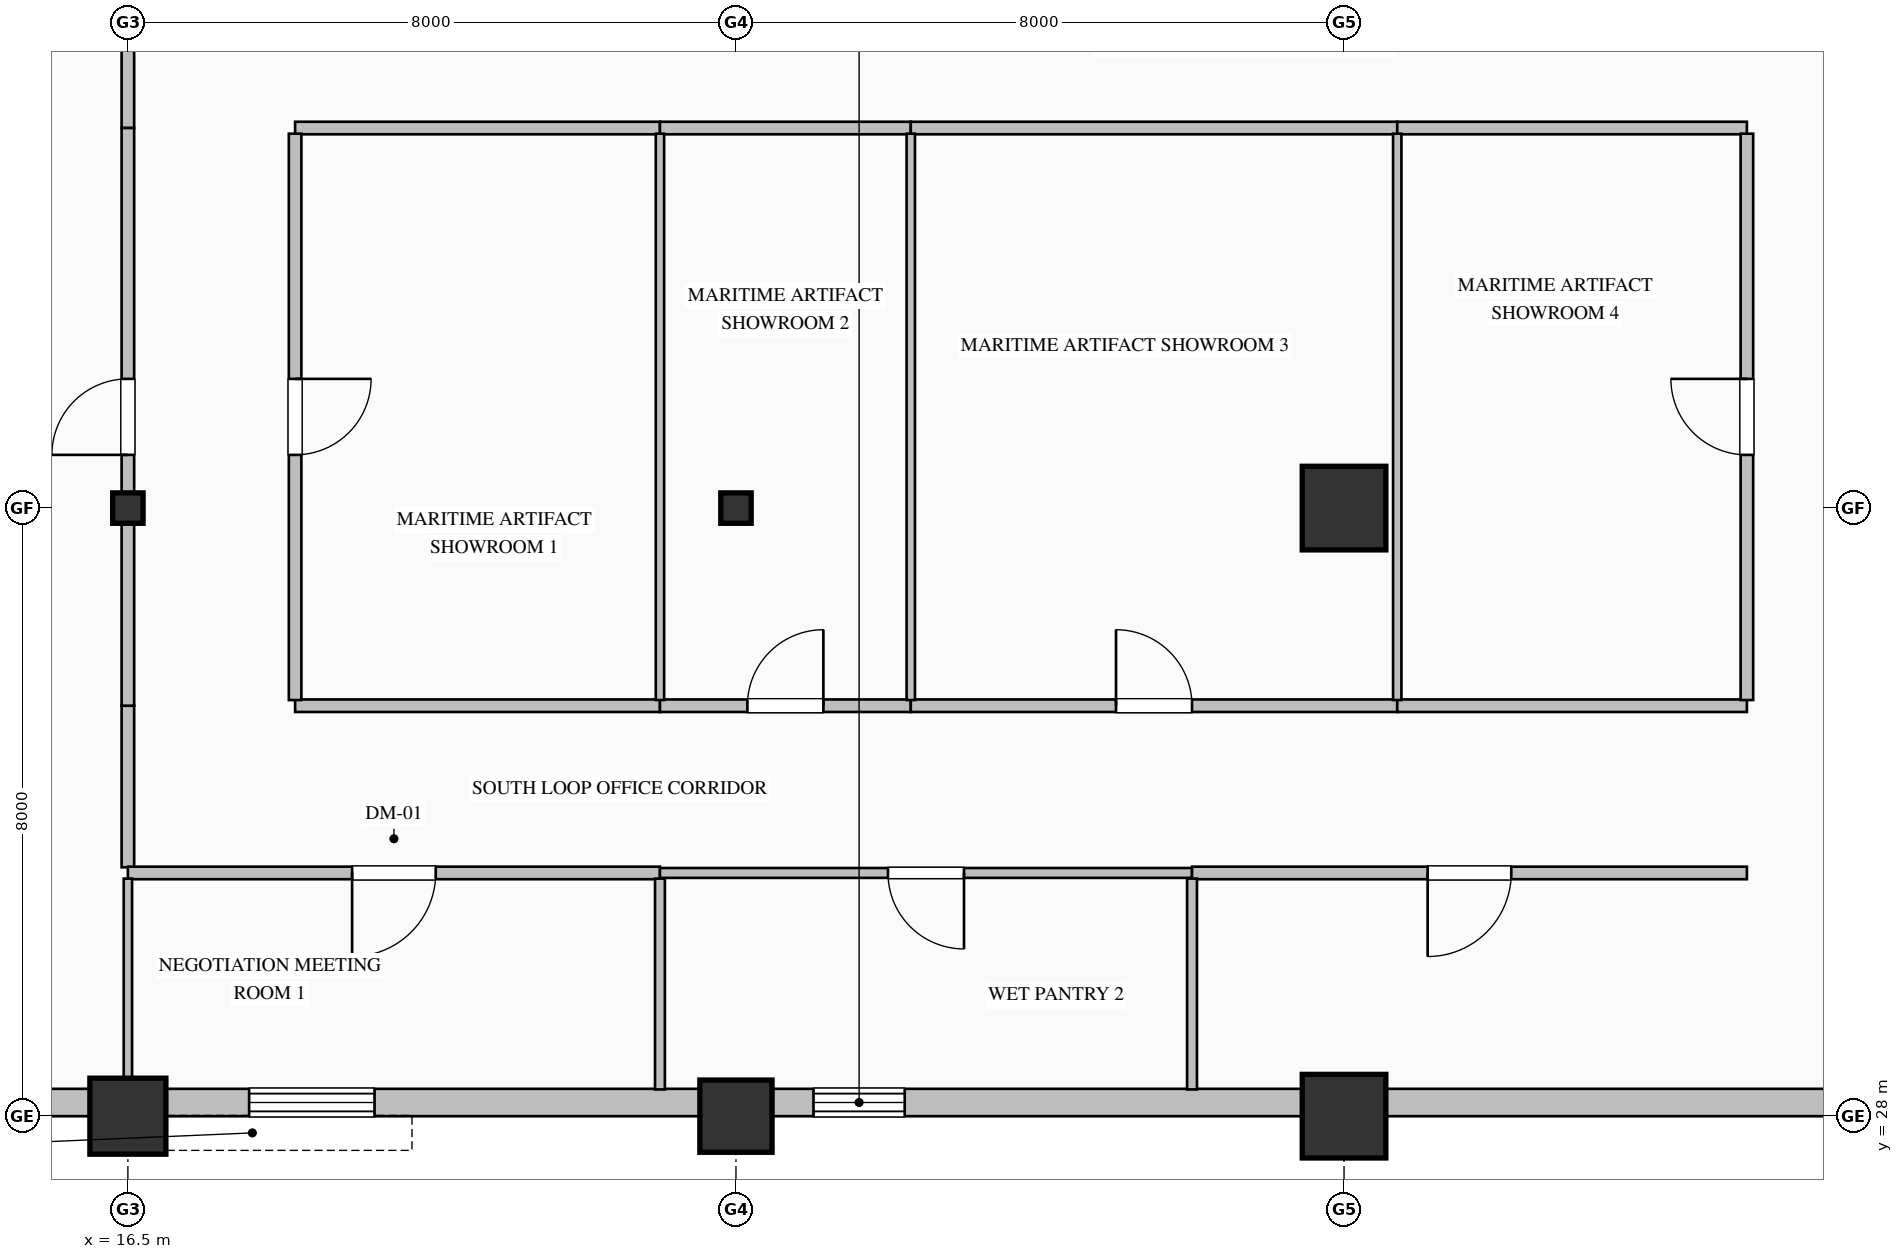
"""IFC4 building model, lengths in metres.
Left out: names, types, materials, properties, quantities, classifications, styles, units other than length and angle.
Written with IfcOpenShell. Run it as: python <this file> out.ifc"""

import sys

from ifc_helpers import new_model, si_unit, direction, frame, frame_2d, origin, origin_2d, place, context, subcontext, project, spatial, rectangle, hollow_rectangle, hollow_circle, i_section, extrude, element, fill, save


model = new_model("IFC4")
c1 = context("Model", 3, precision=1e-05, world=origin(), true_north=direction((0.0, 1.0)))
c2 = subcontext(c1, "Body", "Model", "MODEL_VIEW")
j1 = project(units=[si_unit("LENGTHUNIT", "METRE"), si_unit("PLANEANGLEUNIT", "RADIAN")], contexts=[c1])
p1 = place(None, origin())
s1 = spatial("IfcSite", under=j1, at=p1, CompositionType="ELEMENT")
p2 = place(p1, origin())
s2 = spatial("IfcBuilding", under=s1, at=p2, CompositionType="ELEMENT")
p3 = place(p2, frame((0.0, 0.0, 179.0)))
s3 = spatial("IfcBuildingStorey", under=s2, at=p3, CompositionType="ELEMENT", Elevation=179.0)
p4 = place(p3, frame((16.5, 28.0, 0.0), z_axis=(0.0, 0.0, 1.0), x_axis=(1.0, 0.0, 0.0)))
e1 = element("IfcColumn", 1, at=p4, inside=s3, PredefinedType="COLUMN", context=c2, shape_type="SweptSolid", body=[
    extrude(hollow_circle(Radius=0.5, WallThickness=0.036, at=origin_2d()), origin(), (0.0, 0.0, 1.0), 4.0),
])
p5 = place(p3, frame((16.5, 36.0, 0.0), z_axis=(0.0, 0.0, 1.0), x_axis=(1.0, 0.0, 0.0)))
e2 = element("IfcColumn", 2, at=p5, inside=s3, PredefinedType="COLUMN", context=c2, shape_type="SweptSolid", body=[
    extrude(i_section(OverallWidth=0.4, OverallDepth=0.4, WebThickness=0.013, FlangeThickness=0.021, FilletRadius=0.022, at=origin_2d()), origin(), (0.0, 0.0, 1.0), 4.0),
])
p6 = place(p3, frame((24.5, 28.0, 0.0), z_axis=(0.0, 0.0, 1.0), x_axis=(1.0, 0.0, 0.0)))
e3 = element("IfcColumn", 3, at=p6, inside=s3, PredefinedType="COLUMN", context=c2, shape_type="SweptSolid", body=[
    extrude(hollow_rectangle(XDim=0.95, YDim=0.95, WallThickness=0.036, at=origin_2d()), origin(), (0.0, 0.0, 1.0), 4.0),
])
p7 = place(p3, frame((24.5, 36.0, 0.0), z_axis=(0.0, 0.0, 1.0), x_axis=(1.0, 0.0, 0.0)))
e4 = element("IfcColumn", 4, at=p7, inside=s3, PredefinedType="COLUMN", context=c2, shape_type="SweptSolid", body=[
    extrude(i_section(OverallWidth=0.4, OverallDepth=0.4, WebThickness=0.013, FlangeThickness=0.021, FilletRadius=0.022, at=origin_2d()), origin(), (0.0, 0.0, 1.0), 4.0),
])
for number, where, z_axis, x_axis in (
    (5, (32.5, 28.0, 0.0), (0.0, 0.0, 1.0), (1.0, 0.0, 0.0)),
    (6, (32.5, 36.0, 0.0), (0.0, 0.0, 1.0), (1.0, 0.0, 0.0)),
):
    element("IfcColumn", number, at=place(p3, frame(where, z_axis=z_axis, x_axis=x_axis)), inside=s3, PredefinedType="COLUMN", context=c2, shape_type="SweptSolid", body=[
        extrude(hollow_rectangle(XDim=1.1, YDim=1.1, WallThickness=0.04, at=origin_2d()), origin(), (0.0, 0.0, 1.0), 4.0),
    ])
p8 = place(p3, frame((40.52, 28.18, 0.0), z_axis=(0.0, 0.0, 1.0), x_axis=(-1.0, 0.0, 0.0)))
e7 = element("IfcWall", 7, at=p8, inside=s3, PredefinedType="SOLIDWALL", context=c2, shape_type="SweptSolid", body=[
    extrude(rectangle(XDim=27.52, YDim=0.36, at=frame_2d((13.76, 0.0))), origin(), (0.0, 0.0, 1.0), 3.165),
])
p9 = place(p8, frame((13.8, 0.0, 0.7)))
e8 = element("IfcOpeningElement", 8, at=p9, cuts=e7, PredefinedType="OPENING", context=c2, shape_type="SweptSolid", body=[
    extrude(rectangle(XDim=1.2, YDim=1.85, at=frame_2d((0.6, 0.925))), frame((0.0, 0.19, 0.0), z_axis=(0.0, -1.0, 0.0), x_axis=(1.0, 0.0, 0.0)), (0.0, 0.0, 1.0), 0.38),
])
p10 = place(p8, frame((20.775, 0.0, 0.85)))
e9 = element("IfcOpeningElement", 9, at=p10, cuts=e7, PredefinedType="OPENING", context=c2, shape_type="SweptSolid", body=[
    extrude(rectangle(XDim=1.65, YDim=1.95, at=frame_2d((0.825, 0.975))), frame((0.0, 0.19, 0.0), z_axis=(0.0, -1.0, 0.0), x_axis=(1.0, 0.0, 0.0)), (0.0, 0.0, 1.0), 0.38),
])
p11 = place(p3, frame((18.7, 33.4, 0.0), z_axis=(0.0, 0.0, 1.0), x_axis=(1.0, 0.0, 0.0)))
e10 = element("IfcWall", 10, at=p11, inside=s3, PredefinedType="PARTITIONING", context=c2, shape_type="SweptSolid", body=[
    extrude(rectangle(XDim=4.8, YDim=0.165, at=frame_2d((2.4, 0.0))), origin(), (0.0, 0.0, 1.0), 3.765),
])
p12 = place(p3, frame((23.5, 33.4, 0.0), z_axis=(0.0, 0.0, 1.0), x_axis=(1.0, 0.0, 0.0)))
e11 = element("IfcWall", 11, at=p12, inside=s3, PredefinedType="PARTITIONING", context=c2, shape_type="SweptSolid", body=[
    extrude(rectangle(XDim=3.3, YDim=0.165, at=frame_2d((1.65, 0.0))), origin(), (0.0, 0.0, 1.0), 3.765),
])
p13 = place(p12, frame((1.15, 0.0, 0.0)))
e12 = element("IfcOpeningElement", 12, at=p13, cuts=e11, PredefinedType="OPENING", context=c2, shape_type="SweptSolid", body=[
    extrude(rectangle(XDim=1.0, YDim=2.15, at=frame_2d((0.5, 1.075))), frame((0.0, 0.093, 0.0), z_axis=(0.0, -1.0, 0.0), x_axis=(1.0, 0.0, 0.0)), (0.0, 0.0, 1.0), 0.185),
])
p14 = place(p3, frame((26.8, 33.4, 0.0), z_axis=(0.0, 0.0, 1.0), x_axis=(1.0, 0.0, 0.0)))
e13 = element("IfcWall", 13, at=p14, inside=s3, PredefinedType="PARTITIONING", context=c2, shape_type="SweptSolid", body=[
    extrude(rectangle(XDim=6.4, YDim=0.165, at=frame_2d((3.2, 0.0))), origin(), (0.0, 0.0, 1.0), 3.765),
])
p15 = place(p14, frame((2.7, 0.0, 0.0)))
e14 = element("IfcOpeningElement", 14, at=p15, cuts=e13, PredefinedType="OPENING", context=c2, shape_type="SweptSolid", body=[
    extrude(rectangle(XDim=1.0, YDim=2.15, at=frame_2d((0.5, 1.075))), frame((0.0, 0.093, 0.0), z_axis=(0.0, -1.0, 0.0), x_axis=(1.0, 0.0, 0.0)), (0.0, 0.0, 1.0), 0.185),
])
p16 = place(p3, frame((33.2, 33.4, 0.0), z_axis=(0.0, 0.0, 1.0), x_axis=(1.0, 0.0, 0.0)))
e15 = element("IfcWall", 15, at=p16, inside=s3, PredefinedType="PARTITIONING", context=c2, shape_type="SweptSolid", body=[
    extrude(rectangle(XDim=4.6, YDim=0.165, at=frame_2d((2.3, 0.0))), origin(), (0.0, 0.0, 1.0), 3.765),
])
p17 = place(p3, frame((16.5, 31.274, 0.0), z_axis=(0.0, 0.0, 1.0), x_axis=(0.0, 1.0, 0.0)))
e16 = element("IfcWall", 16, at=p17, inside=s3, PredefinedType="PARTITIONING", context=c2, shape_type="SweptSolid", body=[
    extrude(rectangle(XDim=2.125, YDim=0.165, at=frame_2d((1.063, 0.0))), origin(), (0.0, 0.0, 1.0), 3.157),
])
p18 = place(p3, frame((23.5, 31.2, 0.0), z_axis=(0.0, 0.0, 1.0), x_axis=(-1.0, 0.0, 0.0)))
e17 = element("IfcWall", 17, at=p18, inside=s3, PredefinedType="PARTITIONING", context=c2, shape_type="SweptSolid", body=[
    extrude(rectangle(XDim=7.0, YDim=0.165, at=frame_2d((3.5, 0.0))), origin(), (0.0, 0.0, 1.0), 3.765),
])
p19 = place(p18, frame((2.95, 0.0, 0.0)))
e18 = element("IfcOpeningElement", 18, at=p19, cuts=e17, PredefinedType="OPENING", context=c2, shape_type="SweptSolid", body=[
    extrude(rectangle(XDim=1.1, YDim=2.2, at=frame_2d((0.55, 1.1))), frame((0.0, 0.093, 0.0), z_axis=(0.0, -1.0, 0.0), x_axis=(1.0, 0.0, 0.0)), (0.0, 0.0, 1.0), 0.185),
])
p20 = place(p3, frame((30.5, 31.2, 0.0), z_axis=(0.0, 0.0, 1.0), x_axis=(-1.0, 0.0, 0.0)))
e19 = element("IfcWall", 19, at=p20, inside=s3, PredefinedType="PARTITIONING", context=c2, shape_type="SweptSolid", body=[
    extrude(rectangle(XDim=7.0, YDim=0.13, at=frame_2d((3.5, 0.0))), origin(), (0.0, 0.0, 1.0), 3.765),
])
p21 = place(p20, frame((3.0, 0.0, 0.0)))
e20 = element("IfcOpeningElement", 20, at=p21, cuts=e19, PredefinedType="OPENING", context=c2, shape_type="SweptSolid", body=[
    extrude(rectangle(XDim=1.0, YDim=2.15, at=frame_2d((0.5, 1.075))), frame((0.0, 0.075, 0.0), z_axis=(0.0, -1.0, 0.0), x_axis=(1.0, 0.0, 0.0)), (0.0, 0.0, 1.0), 0.15),
])
p22 = place(p3, frame((37.8, 31.2, 0.0), z_axis=(0.0, 0.0, 1.0), x_axis=(-1.0, 0.0, 0.0)))
e21 = element("IfcWall", 21, at=p22, inside=s3, PredefinedType="PARTITIONING", context=c2, shape_type="SweptSolid", body=[
    extrude(rectangle(XDim=7.3, YDim=0.165, at=frame_2d((3.65, 0.0))), origin(), (0.0, 0.0, 1.0), 3.765),
])
p23 = place(p22, frame((3.1, 0.0, 0.0)))
e22 = element("IfcOpeningElement", 22, at=p23, cuts=e21, PredefinedType="OPENING", context=c2, shape_type="SweptSolid", body=[
    extrude(rectangle(XDim=1.1, YDim=2.2, at=frame_2d((0.55, 1.1))), frame((0.0, 0.093, 0.0), z_axis=(0.0, -1.0, 0.0), x_axis=(1.0, 0.0, 0.0)), (0.0, 0.0, 1.0), 0.185),
])
p24 = place(p3, frame((23.5, 41.0, 0.0), z_axis=(0.0, 0.0, 1.0), x_axis=(-1.0, 0.0, 0.0)))
e23 = element("IfcWall", 23, at=p24, inside=s3, PredefinedType="PARTITIONING", context=c2, shape_type="SweptSolid", body=[
    extrude(rectangle(XDim=4.8, YDim=0.165, at=frame_2d((2.4, 0.0))), origin(), (0.0, 0.0, 1.0), 3.765),
])
p25 = place(p3, frame((26.8, 41.0, 0.0), z_axis=(0.0, 0.0, 1.0), x_axis=(-1.0, 0.0, 0.0)))
e24 = element("IfcWall", 24, at=p25, inside=s3, PredefinedType="PARTITIONING", context=c2, shape_type="SweptSolid", body=[
    extrude(rectangle(XDim=3.3, YDim=0.165, at=frame_2d((1.65, 0.0))), origin(), (0.0, 0.0, 1.0), 3.765),
])
p26 = place(p3, frame((33.2, 41.0, 0.0), z_axis=(0.0, 0.0, 1.0), x_axis=(-1.0, 0.0, 0.0)))
e25 = element("IfcWall", 25, at=p26, inside=s3, PredefinedType="PARTITIONING", context=c2, shape_type="SweptSolid", body=[
    extrude(rectangle(XDim=6.4, YDim=0.165, at=frame_2d((3.2, 0.0))), origin(), (0.0, 0.0, 1.0), 3.765),
])
p27 = place(p3, frame((37.8, 41.0, 0.0), z_axis=(0.0, 0.0, 1.0), x_axis=(-1.0, 0.0, 0.0)))
e26 = element("IfcWall", 26, at=p27, inside=s3, PredefinedType="PARTITIONING", context=c2, shape_type="SweptSolid", body=[
    extrude(rectangle(XDim=4.6, YDim=0.165, at=frame_2d((2.3, 0.0))), origin(), (0.0, 0.0, 1.0), 3.765),
])
p28 = place(p3, frame((16.5, 41.0, 0.0), z_axis=(0.0, 0.0, 1.0), x_axis=(0.0, 1.0, 0.0)))
e27 = element("IfcWall", 27, at=p28, inside=s3, PredefinedType="PARTITIONING", context=c2, shape_type="SweptSolid", body=[
    extrude(rectangle(XDim=2.125, YDim=0.165, at=frame_2d((1.063, 0.0))), origin(), (0.0, 0.0, 1.0), 3.157),
])
p29 = place(p3, frame((18.7, 40.926, 0.0), z_axis=(0.0, 0.0, 1.0), x_axis=(0.0, -1.0, 0.0)))
e28 = element("IfcWall", 28, at=p29, inside=s3, PredefinedType="PARTITIONING", context=c2, shape_type="SweptSolid", body=[
    extrude(rectangle(XDim=7.451, YDim=0.165, at=frame_2d((3.726, 0.0))), origin(), (0.0, 0.0, 1.0), 3.765),
])
p30 = place(p29, frame((3.226, 0.0, 0.0)))
e29 = element("IfcOpeningElement", 29, at=p30, cuts=e28, PredefinedType="OPENING", context=c2, shape_type="SweptSolid", body=[
    extrude(rectangle(XDim=1.0, YDim=2.15, at=frame_2d((0.5, 1.075))), frame((0.0, 0.093, 0.0), z_axis=(0.0, -1.0, 0.0), x_axis=(1.0, 0.0, 0.0)), (0.0, 0.0, 1.0), 0.185),
])
p31 = place(p3, frame((16.5, 33.4, 0.0), z_axis=(0.0, 0.0, 1.0), x_axis=(0.0, 1.0, 0.0)))
e30 = element("IfcWall", 30, at=p31, inside=s3, PredefinedType="PARTITIONING", context=c2, shape_type="SweptSolid", body=[
    extrude(rectangle(XDim=7.6, YDim=0.165, at=frame_2d((3.8, 0.0))), origin(), (0.0, 0.0, 1.0), 3.157),
])
p32 = place(p31, frame((3.3, 0.0, 0.0)))
e31 = element("IfcOpeningElement", 31, at=p32, cuts=e30, PredefinedType="OPENING", context=c2, shape_type="SweptSolid", body=[
    extrude(rectangle(XDim=1.0, YDim=2.15, at=frame_2d((0.5, 1.075))), frame((0.0, 0.093, 0.0), z_axis=(0.0, -1.0, 0.0), x_axis=(1.0, 0.0, 0.0)), (0.0, 0.0, 1.0), 0.185),
])
p33 = place(p3, frame((37.8, 33.475, 0.0), z_axis=(0.0, 0.0, 1.0), x_axis=(0.0, 1.0, 0.0)))
e32 = element("IfcWall", 32, at=p33, inside=s3, PredefinedType="PARTITIONING", context=c2, shape_type="SweptSolid", body=[
    extrude(rectangle(XDim=7.451, YDim=0.165, at=frame_2d((3.726, 0.0))), origin(), (0.0, 0.0, 1.0), 3.765),
])
p34 = place(p33, frame((3.226, 0.0, 0.0)))
e33 = element("IfcOpeningElement", 33, at=p34, cuts=e32, PredefinedType="OPENING", context=c2, shape_type="SweptSolid", body=[
    extrude(rectangle(XDim=1.0, YDim=2.15, at=frame_2d((0.5, 1.075))), frame((0.0, 0.093, 0.0), z_axis=(0.0, -1.0, 0.0), x_axis=(1.0, 0.0, 0.0)), (0.0, 0.0, 1.0), 0.185),
])
for number, where, z_axis, x_axis in (
    (34, (23.5, 40.926, 0.0), (0.0, 0.0, 1.0), (0.0, -1.0, 0.0)),
    (35, (26.8, 40.926, 0.0), (0.0, 0.0, 1.0), (0.0, -1.0, 0.0)),
    (36, (33.2, 40.926, 0.0), (0.0, 0.0, 1.0), (0.0, -1.0, 0.0)),
):
    element("IfcWall", number, at=place(p3, frame(where, z_axis=z_axis, x_axis=x_axis)), inside=s3, PredefinedType="MOVABLE", context=c2, shape_type="SweptSolid", body=[
        extrude(rectangle(XDim=7.451, YDim=0.11, at=frame_2d((3.726, 0.0))), origin(), (0.0, 0.0, 1.0), 3.765),
    ])
p35 = place(p3, frame((16.5, 31.125, 0.0), z_axis=(0.0, 0.0, 1.0), x_axis=(0.0, -1.0, 0.0)))
e37 = element("IfcWall", 37, at=p35, inside=s3, PredefinedType="MOVABLE", context=c2, shape_type="SweptSolid", body=[
    extrude(rectangle(XDim=2.773, YDim=0.11, at=frame_2d((1.387, 0.0))), origin(), (0.0, 0.0, 1.0), 3.157),
])
for number, where, z_axis, x_axis in (
    (38, (23.5, 31.125, 0.0), (0.0, 0.0, 1.0), (0.0, -1.0, 0.0)),
    (39, (30.5, 31.125, 0.0), (0.0, 0.0, 1.0), (0.0, -1.0, 0.0)),
):
    element("IfcWall", number, at=place(p3, frame(where, z_axis=z_axis, x_axis=x_axis)), inside=s3, PredefinedType="PARTITIONING", context=c2, shape_type="SweptSolid", body=[
        extrude(rectangle(XDim=2.773, YDim=0.13, at=frame_2d((1.387, 0.0))), origin(), (0.0, 0.0, 1.0), 3.765),
    ])
p36 = place(p9, origin())
e40 = element("IfcWindow", 40, at=p36, inside=s3, PartitioningType="DOUBLE_PANEL_VERTICAL", PredefinedType="WINDOW", context=c2, shape_type="SweptSolid", body=[
    extrude(rectangle(XDim=1.2, YDim=1.85, at=frame_2d((0.6, 0.925))), frame((0.0, 0.15, 0.0), z_axis=(0.0, -1.0, 0.0), x_axis=(1.0, 0.0, 0.0)), (0.0, 0.0, 1.0), 0.06),
])
fill(e8, e40)
p37 = place(p10, origin())
e41 = element("IfcWindow", 41, at=p37, inside=s3, PartitioningType="DOUBLE_PANEL_VERTICAL", PredefinedType="WINDOW", context=c2, shape_type="SweptSolid", body=[
    extrude(rectangle(XDim=1.65, YDim=1.95, at=frame_2d((0.825, 0.975))), frame((0.0, 0.15, 0.0), z_axis=(0.0, -1.0, 0.0), x_axis=(1.0, 0.0, 0.0)), (0.0, 0.0, 1.0), 0.06),
])
fill(e9, e41)
p38 = place(p30, origin())
e42 = element("IfcDoor", 42, at=p38, inside=s3, OperationType="SINGLE_SWING_LEFT", PredefinedType="DOOR", context=c2, shape_type="SweptSolid", body=[
    extrude(rectangle(XDim=1.0, YDim=2.15, at=frame_2d((0.5, 1.075))), frame((0.0, 0.025, 0.0), z_axis=(0.0, -1.0, 0.0), x_axis=(1.0, 0.0, 0.0)), (0.0, 0.0, 1.0), 0.05),
])
fill(e29, e42)
p39 = place(p13, origin())
e43 = element("IfcDoor", 43, at=p39, inside=s3, OperationType="SINGLE_SWING_RIGHT", PredefinedType="DOOR", context=c2, shape_type="SweptSolid", body=[
    extrude(rectangle(XDim=1.0, YDim=2.15, at=frame_2d((0.5, 1.075))), frame((0.0, 0.025, 0.0), z_axis=(0.0, -1.0, 0.0), x_axis=(1.0, 0.0, 0.0)), (0.0, 0.0, 1.0), 0.05),
])
fill(e12, e43)
p40 = place(p15, origin())
e44 = element("IfcDoor", 44, at=p40, inside=s3, OperationType="SINGLE_SWING_LEFT", PredefinedType="DOOR", context=c2, shape_type="SweptSolid", body=[
    extrude(rectangle(XDim=1.0, YDim=2.15, at=frame_2d((0.5, 1.075))), frame((0.0, 0.025, 0.0), z_axis=(0.0, -1.0, 0.0), x_axis=(1.0, 0.0, 0.0)), (0.0, 0.0, 1.0), 0.05),
])
fill(e14, e44)
p41 = place(p34, origin())
e45 = element("IfcDoor", 45, at=p41, inside=s3, OperationType="SINGLE_SWING_RIGHT", PredefinedType="DOOR", context=c2, shape_type="SweptSolid", body=[
    extrude(rectangle(XDim=1.0, YDim=2.15, at=frame_2d((0.5, 1.075))), frame((0.0, 0.025, 0.0), z_axis=(0.0, -1.0, 0.0), x_axis=(1.0, 0.0, 0.0)), (0.0, 0.0, 1.0), 0.05),
])
fill(e33, e45)
p42 = place(p32, origin())
e46 = element("IfcDoor", 46, at=p42, inside=s3, OperationType="SINGLE_SWING_LEFT", PredefinedType="DOOR", context=c2, shape_type="SweptSolid", body=[
    extrude(rectangle(XDim=1.0, YDim=2.15, at=frame_2d((0.5, 1.075))), frame((0.0, 0.025, 0.0), z_axis=(0.0, -1.0, 0.0), x_axis=(1.0, 0.0, 0.0)), (0.0, 0.0, 1.0), 0.05),
])
fill(e31, e46)
p43 = place(p19, origin())
e47 = element("IfcDoor", 47, at=p43, inside=s3, OperationType="SINGLE_SWING_RIGHT", PredefinedType="DOOR", context=c2, shape_type="SweptSolid", body=[
    extrude(rectangle(XDim=1.1, YDim=2.2, at=frame_2d((0.55, 1.1))), frame((0.0, 0.025, 0.0), z_axis=(0.0, -1.0, 0.0), x_axis=(1.0, 0.0, 0.0)), (0.0, 0.0, 1.0), 0.05),
])
fill(e18, e47)
p44 = place(p21, origin())
e48 = element("IfcDoor", 48, at=p44, inside=s3, OperationType="SINGLE_SWING_LEFT", PredefinedType="DOOR", context=c2, shape_type="SweptSolid", body=[
    extrude(rectangle(XDim=1.0, YDim=2.15, at=frame_2d((0.5, 1.075))), frame((0.0, 0.025, 0.0), z_axis=(0.0, -1.0, 0.0), x_axis=(1.0, 0.0, 0.0)), (0.0, 0.0, 1.0), 0.05),
])
fill(e20, e48)
p45 = place(p23, origin())
e49 = element("IfcDoor", 49, at=p45, inside=s3, OperationType="SINGLE_SWING_RIGHT", PredefinedType="DOOR", context=c2, shape_type="SweptSolid", body=[
    extrude(rectangle(XDim=1.1, YDim=2.2, at=frame_2d((0.55, 1.1))), frame((0.0, 0.025, 0.0), z_axis=(0.0, -1.0, 0.0), x_axis=(1.0, 0.0, 0.0)), (0.0, 0.0, 1.0), 0.05),
])
fill(e22, e49)
save(model, sys.argv[1])
